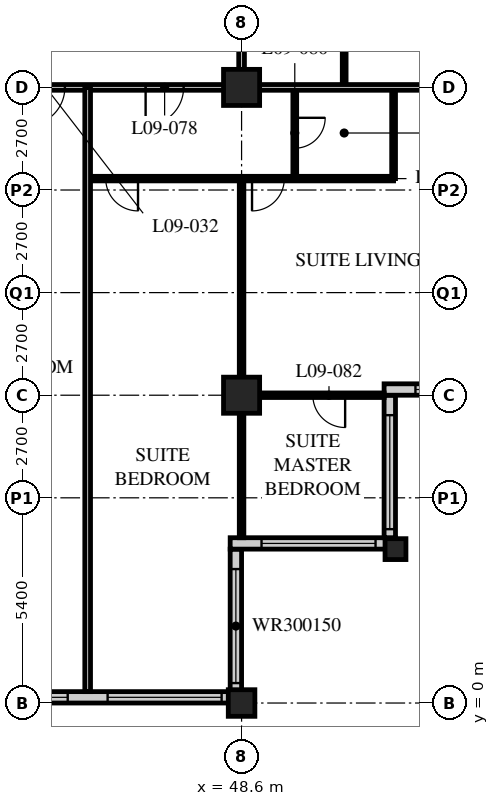
"""IFC4 building model, lengths in metres.
Left out: names, types, materials, properties, quantities, classifications, styles, units other than length and angle.
Written with IfcOpenShell. Run it as: python <this file> out.ifc"""

import sys

from ifc_helpers import new_model, si_unit, direction, frame, frame_2d, origin, origin_2d, place, context, subcontext, project, spatial, rectangle, hollow_rectangle, extrude, element, fill, save


model = new_model("IFC4")
c1 = context("Model", 3, precision=1e-05, world=origin(), true_north=direction((0.0, 1.0)))
c2 = subcontext(c1, "Body", "Model", "MODEL_VIEW")
j1 = project(units=[si_unit("LENGTHUNIT", "METRE"), si_unit("PLANEANGLEUNIT", "RADIAN")], contexts=[c1])
p1 = place(None, origin())
s1 = spatial("IfcSite", under=j1, at=p1, CompositionType="ELEMENT")
p2 = place(p1, origin())
s2 = spatial("IfcBuilding", under=s1, at=p2, CompositionType="ELEMENT")
p3 = place(p2, frame((0.0, 0.0, 43.2)))
s3 = spatial("IfcBuildingStorey", under=s2, at=p3, CompositionType="ELEMENT", Elevation=43.2)
p4 = place(p3, frame((48.6, 0.0, 0.0), z_axis=(0.0, 0.0, 1.0), x_axis=(1.0, 0.0, 0.0)))
e1 = element("IfcColumn", 1, at=p4, inside=s3, PredefinedType="COLUMN", context=c2, shape_type="SweptSolid", body=[
    extrude(hollow_rectangle(XDim=0.7, YDim=0.7, WallThickness=0.06, at=origin_2d()), origin(), (0.0, 0.0, 1.0), 3.4),
])
for number, where, z_axis, x_axis in (
    (2, (48.6, 8.1, 0.0), (0.0, 0.0, 1.0), (1.0, 0.0, 0.0)),
    (3, (48.6, 16.2, 0.0), (0.0, 0.0, 1.0), (1.0, 0.0, 0.0)),
):
    element("IfcColumn", number, at=place(p3, frame(where, z_axis=z_axis, x_axis=x_axis)), inside=s3, PredefinedType="COLUMN", context=c2, shape_type="SweptSolid", body=[
        extrude(hollow_rectangle(XDim=0.95, YDim=0.95, WallThickness=0.095, at=origin_2d()), origin(), (0.0, 0.0, 1.0), 3.4),
    ])
p5 = place(p3, frame((52.65, 4.05, 0.0), z_axis=(0.0, 0.0, 1.0), x_axis=(1.0, 0.0, 0.0)))
e4 = element("IfcColumn", 4, at=p5, inside=s3, PredefinedType="COLUMN", context=c2, shape_type="SweptSolid", body=[
    extrude(hollow_rectangle(XDim=0.55, YDim=0.55, WallThickness=0.05, at=origin_2d()), origin(), (0.0, 0.0, 1.0), 3.4),
])
p6 = place(p3, frame((8.4, 0.15, 0.0), z_axis=(0.0, 0.0, 1.0), x_axis=(1.0, 0.0, 0.0)))
e5 = element("IfcWall", 5, at=p6, inside=s3, PredefinedType="SOLIDWALL", context=c2, shape_type="SweptSolid", body=[
    extrude(rectangle(XDim=40.2, YDim=0.3, at=frame_2d((20.1, 0.0))), origin(), (0.0, 0.0, 1.0), 3.19),
])
p7 = place(p6, frame((0.225, 0.0, 0.9)))
e6 = element("IfcOpeningElement", 6, at=p7, cuts=e5, PredefinedType="OPENING", context=c2, shape_type="SweptSolid", body=[
    extrude(rectangle(XDim=3.0, YDim=2.0, at=frame_2d((1.5, 1.0))), frame((0.0, 0.16, 0.0), z_axis=(0.0, -1.0, 0.0), x_axis=(1.0, 0.0, 0.0)), (0.0, 0.0, 1.0), 0.32),
])
p8 = place(p6, frame((4.275, 0.0, 0.9)))
e7 = element("IfcOpeningElement", 7, at=p8, cuts=e5, PredefinedType="OPENING", context=c2, shape_type="SweptSolid", body=[
    extrude(rectangle(XDim=3.0, YDim=2.0, at=frame_2d((1.5, 1.0))), frame((0.0, 0.16, 0.0), z_axis=(0.0, -1.0, 0.0), x_axis=(1.0, 0.0, 0.0)), (0.0, 0.0, 1.0), 0.32),
])
p9 = place(p6, frame((8.325, 0.0, 0.9)))
e8 = element("IfcOpeningElement", 8, at=p9, cuts=e5, PredefinedType="OPENING", context=c2, shape_type="SweptSolid", body=[
    extrude(rectangle(XDim=3.0, YDim=2.0, at=frame_2d((1.5, 1.0))), frame((0.0, 0.16, 0.0), z_axis=(0.0, -1.0, 0.0), x_axis=(1.0, 0.0, 0.0)), (0.0, 0.0, 1.0), 0.32),
])
p10 = place(p6, frame((12.375, 0.0, 0.9)))
e9 = element("IfcOpeningElement", 9, at=p10, cuts=e5, PredefinedType="OPENING", context=c2, shape_type="SweptSolid", body=[
    extrude(rectangle(XDim=3.0, YDim=2.0, at=frame_2d((1.5, 1.0))), frame((0.0, 0.16, 0.0), z_axis=(0.0, -1.0, 0.0), x_axis=(1.0, 0.0, 0.0)), (0.0, 0.0, 1.0), 0.32),
])
p11 = place(p6, frame((16.425, 0.0, 0.9)))
e10 = element("IfcOpeningElement", 10, at=p11, cuts=e5, PredefinedType="OPENING", context=c2, shape_type="SweptSolid", body=[
    extrude(rectangle(XDim=3.0, YDim=2.0, at=frame_2d((1.5, 1.0))), frame((0.0, 0.16, 0.0), z_axis=(0.0, -1.0, 0.0), x_axis=(1.0, 0.0, 0.0)), (0.0, 0.0, 1.0), 0.32),
])
p12 = place(p6, frame((20.475, 0.0, 0.9)))
e11 = element("IfcOpeningElement", 11, at=p12, cuts=e5, PredefinedType="OPENING", context=c2, shape_type="SweptSolid", body=[
    extrude(rectangle(XDim=3.0, YDim=2.0, at=frame_2d((1.5, 1.0))), frame((0.0, 0.16, 0.0), z_axis=(0.0, -1.0, 0.0), x_axis=(1.0, 0.0, 0.0)), (0.0, 0.0, 1.0), 0.32),
])
p13 = place(p6, frame((24.525, 0.0, 0.9)))
e12 = element("IfcOpeningElement", 12, at=p13, cuts=e5, PredefinedType="OPENING", context=c2, shape_type="SweptSolid", body=[
    extrude(rectangle(XDim=3.0, YDim=2.0, at=frame_2d((1.5, 1.0))), frame((0.0, 0.16, 0.0), z_axis=(0.0, -1.0, 0.0), x_axis=(1.0, 0.0, 0.0)), (0.0, 0.0, 1.0), 0.32),
])
p14 = place(p6, frame((28.575, 0.0, 0.9)))
e13 = element("IfcOpeningElement", 13, at=p14, cuts=e5, PredefinedType="OPENING", context=c2, shape_type="SweptSolid", body=[
    extrude(rectangle(XDim=3.0, YDim=2.0, at=frame_2d((1.5, 1.0))), frame((0.0, 0.16, 0.0), z_axis=(0.0, -1.0, 0.0), x_axis=(1.0, 0.0, 0.0)), (0.0, 0.0, 1.0), 0.32),
])
p15 = place(p6, frame((32.625, 0.0, 0.9)))
e14 = element("IfcOpeningElement", 14, at=p15, cuts=e5, PredefinedType="OPENING", context=c2, shape_type="SweptSolid", body=[
    extrude(rectangle(XDim=3.0, YDim=2.0, at=frame_2d((1.5, 1.0))), frame((0.0, 0.16, 0.0), z_axis=(0.0, -1.0, 0.0), x_axis=(1.0, 0.0, 0.0)), (0.0, 0.0, 1.0), 0.32),
])
p16 = place(p6, frame((36.675, 0.0, 0.9)))
e15 = element("IfcOpeningElement", 15, at=p16, cuts=e5, PredefinedType="OPENING", context=c2, shape_type="SweptSolid", body=[
    extrude(rectangle(XDim=3.0, YDim=2.0, at=frame_2d((1.5, 1.0))), frame((0.0, 0.16, 0.0), z_axis=(0.0, -1.0, 0.0), x_axis=(1.0, 0.0, 0.0)), (0.0, 0.0, 1.0), 0.32),
])
p17 = place(p3, frame((48.45, 0.3, 0.0), z_axis=(0.0, 0.0, 1.0), x_axis=(0.0, 1.0, 0.0)))
e16 = element("IfcWall", 16, at=p17, inside=s3, PredefinedType="SOLIDWALL", context=c2, shape_type="SweptSolid", body=[
    extrude(rectangle(XDim=3.75, YDim=0.3, at=frame_2d((1.875, 0.0))), origin(), (0.0, 0.0, 1.0), 3.19),
])
p18 = place(p17, frame((0.225, 0.0, 0.9)))
e17 = element("IfcOpeningElement", 17, at=p18, cuts=e16, PredefinedType="OPENING", context=c2, shape_type="SweptSolid", body=[
    extrude(rectangle(XDim=3.0, YDim=1.5, at=frame_2d((1.5, 0.75))), frame((0.0, 0.16, 0.0), z_axis=(0.0, -1.0, 0.0), x_axis=(1.0, 0.0, 0.0)), (0.0, 0.0, 1.0), 0.32),
])
p19 = place(p3, frame((48.3, 4.2, 0.0), z_axis=(0.0, 0.0, 1.0), x_axis=(1.0, 0.0, 0.0)))
e18 = element("IfcWall", 18, at=p19, inside=s3, PredefinedType="SOLIDWALL", context=c2, shape_type="SweptSolid", body=[
    extrude(rectangle(XDim=4.35, YDim=0.3, at=frame_2d((2.175, 0.0))), origin(), (0.0, 0.0, 1.0), 3.19),
])
p20 = place(p19, frame((0.825, 0.0, 0.9)))
e19 = element("IfcOpeningElement", 19, at=p20, cuts=e18, PredefinedType="OPENING", context=c2, shape_type="SweptSolid", body=[
    extrude(rectangle(XDim=3.0, YDim=1.5, at=frame_2d((1.5, 0.75))), frame((0.0, 0.16, 0.0), z_axis=(0.0, -1.0, 0.0), x_axis=(1.0, 0.0, 0.0)), (0.0, 0.0, 1.0), 0.32),
])
p21 = place(p3, frame((52.5, 4.35, 0.0), z_axis=(0.0, 0.0, 1.0), x_axis=(0.0, 1.0, 0.0)))
e20 = element("IfcWall", 20, at=p21, inside=s3, PredefinedType="SOLIDWALL", context=c2, shape_type="SweptSolid", body=[
    extrude(rectangle(XDim=3.75, YDim=0.3, at=frame_2d((1.875, 0.0))), origin(), (0.0, 0.0, 1.0), 3.19),
])
p22 = place(p21, frame((0.225, 0.0, 0.9)))
e21 = element("IfcOpeningElement", 21, at=p22, cuts=e20, PredefinedType="OPENING", context=c2, shape_type="SweptSolid", body=[
    extrude(rectangle(XDim=3.0, YDim=1.5, at=frame_2d((1.5, 0.75))), frame((0.0, 0.16, 0.0), z_axis=(0.0, -1.0, 0.0), x_axis=(1.0, 0.0, 0.0)), (0.0, 0.0, 1.0), 0.32),
])
p23 = place(p3, frame((52.35, 8.25, 0.0), z_axis=(0.0, 0.0, 1.0), x_axis=(1.0, 0.0, 0.0)))
e22 = element("IfcWall", 22, at=p23, inside=s3, PredefinedType="SOLIDWALL", context=c2, shape_type="SweptSolid", body=[
    extrude(rectangle(XDim=4.35, YDim=0.3, at=frame_2d((2.175, 0.0))), origin(), (0.0, 0.0, 1.0), 3.19),
])
p24 = place(p23, frame((0.825, 0.0, 0.9)))
e23 = element("IfcOpeningElement", 23, at=p24, cuts=e22, PredefinedType="OPENING", context=c2, shape_type="SweptSolid", body=[
    extrude(rectangle(XDim=3.0, YDim=1.5, at=frame_2d((1.5, 0.75))), frame((0.0, 0.16, 0.0), z_axis=(0.0, -1.0, 0.0), x_axis=(1.0, 0.0, 0.0)), (0.0, 0.0, 1.0), 0.32),
])
p25 = place(p3, frame((8.1, 16.2, 0.0), z_axis=(0.0, 0.0, 1.0), x_axis=(1.0, 0.0, 0.0)))
e24 = element("IfcWall", 24, at=p25, inside=s3, PredefinedType="PARTITIONING", context=c2, shape_type="SweptSolid", body=[
    extrude(rectangle(XDim=40.5, YDim=0.15, at=frame_2d((20.25, 0.0))), origin(), (0.0, 0.0, 1.0), 2.578),
])
p26 = place(p25, frame((4.35, 0.0, 0.0)))
e25 = element("IfcOpeningElement", 25, at=p26, cuts=e24, PredefinedType="OPENING", context=c2, shape_type="SweptSolid", body=[
    extrude(rectangle(XDim=1.0, YDim=2.1, at=frame_2d((0.5, 1.05))), frame((0.0, 0.085, 0.0), z_axis=(0.0, -1.0, 0.0), x_axis=(1.0, 0.0, 0.0)), (0.0, 0.0, 1.0), 0.17),
])
p27 = place(p25, frame((10.85, 0.0, 0.0)))
e26 = element("IfcOpeningElement", 26, at=p27, cuts=e24, PredefinedType="OPENING", context=c2, shape_type="SweptSolid", body=[
    extrude(rectangle(XDim=1.0, YDim=2.1, at=frame_2d((0.5, 1.05))), frame((0.0, 0.085, 0.0), z_axis=(0.0, -1.0, 0.0), x_axis=(1.0, 0.0, 0.0)), (0.0, 0.0, 1.0), 0.17),
])
p28 = place(p25, frame((12.75, 0.0, 0.0)))
e27 = element("IfcOpeningElement", 27, at=p28, cuts=e24, PredefinedType="OPENING", context=c2, shape_type="SweptSolid", body=[
    extrude(rectangle(XDim=1.0, YDim=2.1, at=frame_2d((0.5, 1.05))), frame((0.0, 0.085, 0.0), z_axis=(0.0, -1.0, 0.0), x_axis=(1.0, 0.0, 0.0)), (0.0, 0.0, 1.0), 0.17),
])
p29 = place(p25, frame((18.95, 0.0, 0.0)))
e28 = element("IfcOpeningElement", 28, at=p29, cuts=e24, PredefinedType="OPENING", context=c2, shape_type="SweptSolid", body=[
    extrude(rectangle(XDim=1.0, YDim=2.1, at=frame_2d((0.5, 1.05))), frame((0.0, 0.085, 0.0), z_axis=(0.0, -1.0, 0.0), x_axis=(1.0, 0.0, 0.0)), (0.0, 0.0, 1.0), 0.17),
])
p30 = place(p25, frame((20.55, 0.0, 0.0)))
e29 = element("IfcOpeningElement", 29, at=p30, cuts=e24, PredefinedType="OPENING", context=c2, shape_type="SweptSolid", body=[
    extrude(rectangle(XDim=1.0, YDim=2.1, at=frame_2d((0.5, 1.05))), frame((0.0, 0.085, 0.0), z_axis=(0.0, -1.0, 0.0), x_axis=(1.0, 0.0, 0.0)), (0.0, 0.0, 1.0), 0.17),
])
p31 = place(p25, frame((27.05, 0.0, 0.0)))
e30 = element("IfcOpeningElement", 30, at=p31, cuts=e24, PredefinedType="OPENING", context=c2, shape_type="SweptSolid", body=[
    extrude(rectangle(XDim=1.0, YDim=2.1, at=frame_2d((0.5, 1.05))), frame((0.0, 0.085, 0.0), z_axis=(0.0, -1.0, 0.0), x_axis=(1.0, 0.0, 0.0)), (0.0, 0.0, 1.0), 0.17),
])
p32 = place(p25, frame((28.95, 0.0, 0.0)))
e31 = element("IfcOpeningElement", 31, at=p32, cuts=e24, PredefinedType="OPENING", context=c2, shape_type="SweptSolid", body=[
    extrude(rectangle(XDim=1.0, YDim=2.1, at=frame_2d((0.5, 1.05))), frame((0.0, 0.085, 0.0), z_axis=(0.0, -1.0, 0.0), x_axis=(1.0, 0.0, 0.0)), (0.0, 0.0, 1.0), 0.17),
])
p33 = place(p25, frame((34.85, 0.0, 0.0)))
e32 = element("IfcOpeningElement", 32, at=p33, cuts=e24, PredefinedType="OPENING", context=c2, shape_type="SweptSolid", body=[
    extrude(rectangle(XDim=1.0, YDim=2.1, at=frame_2d((0.5, 1.05))), frame((0.0, 0.085, 0.0), z_axis=(0.0, -1.0, 0.0), x_axis=(1.0, 0.0, 0.0)), (0.0, 0.0, 1.0), 0.17),
])
p34 = place(p25, frame((1.525, 0.0, 0.0)))
e33 = element("IfcOpeningElement", 33, at=p34, cuts=e24, PredefinedType="OPENING", context=c2, shape_type="SweptSolid", body=[
    extrude(rectangle(XDim=1.0, YDim=2.1, at=frame_2d((0.5, 1.05))), frame((0.0, 0.085, 0.0), z_axis=(0.0, -1.0, 0.0), x_axis=(1.0, 0.0, 0.0)), (0.0, 0.0, 1.0), 0.17),
])
p35 = place(p25, frame((37.975, 0.0, 0.0)))
e34 = element("IfcOpeningElement", 34, at=p35, cuts=e24, PredefinedType="OPENING", context=c2, shape_type="SweptSolid", body=[
    extrude(rectangle(XDim=1.0, YDim=2.1, at=frame_2d((0.5, 1.05))), frame((0.0, 0.085, 0.0), z_axis=(0.0, -1.0, 0.0), x_axis=(1.0, 0.0, 0.0)), (0.0, 0.0, 1.0), 0.17),
])
p36 = place(p3, frame((48.6, 16.2, 0.0), z_axis=(0.0, 0.0, 1.0), x_axis=(0.0, 1.0, 0.0)))
e35 = element("IfcWall", 35, at=p36, inside=s3, PredefinedType="PARTITIONING", context=c2, shape_type="SweptSolid", body=[
    extrude(rectangle(XDim=26.1, YDim=0.15, at=frame_2d((13.05, 0.0))), origin(), (0.0, 0.0, 1.0), 2.578),
])
p37 = place(p36, frame((2.75, 0.0, 0.0)))
e36 = element("IfcOpeningElement", 36, at=p37, cuts=e35, PredefinedType="OPENING", context=c2, shape_type="SweptSolid", body=[
    extrude(rectangle(XDim=1.0, YDim=2.1, at=frame_2d((0.5, 1.05))), frame((0.0, 0.085, 0.0), z_axis=(0.0, -1.0, 0.0), x_axis=(1.0, 0.0, 0.0)), (0.0, 0.0, 1.0), 0.17),
])
p38 = place(p36, frame((4.35, 0.0, 0.0)))
e37 = element("IfcOpeningElement", 37, at=p38, cuts=e35, PredefinedType="OPENING", context=c2, shape_type="SweptSolid", body=[
    extrude(rectangle(XDim=1.0, YDim=2.1, at=frame_2d((0.5, 1.05))), frame((0.0, 0.085, 0.0), z_axis=(0.0, -1.0, 0.0), x_axis=(1.0, 0.0, 0.0)), (0.0, 0.0, 1.0), 0.17),
])
p39 = place(p36, frame((10.85, 0.0, 0.0)))
e38 = element("IfcOpeningElement", 38, at=p39, cuts=e35, PredefinedType="OPENING", context=c2, shape_type="SweptSolid", body=[
    extrude(rectangle(XDim=1.0, YDim=2.1, at=frame_2d((0.5, 1.05))), frame((0.0, 0.085, 0.0), z_axis=(0.0, -1.0, 0.0), x_axis=(1.0, 0.0, 0.0)), (0.0, 0.0, 1.0), 0.17),
])
p40 = place(p36, frame((12.45, 0.0, 0.0)))
e39 = element("IfcOpeningElement", 39, at=p40, cuts=e35, PredefinedType="OPENING", context=c2, shape_type="SweptSolid", body=[
    extrude(rectangle(XDim=1.0, YDim=2.1, at=frame_2d((0.5, 1.05))), frame((0.0, 0.085, 0.0), z_axis=(0.0, -1.0, 0.0), x_axis=(1.0, 0.0, 0.0)), (0.0, 0.0, 1.0), 0.17),
])
p41 = place(p36, frame((18.65, 0.0, 0.0)))
e40 = element("IfcOpeningElement", 40, at=p41, cuts=e35, PredefinedType="OPENING", context=c2, shape_type="SweptSolid", body=[
    extrude(rectangle(XDim=1.0, YDim=2.1, at=frame_2d((0.5, 1.05))), frame((0.0, 0.085, 0.0), z_axis=(0.0, -1.0, 0.0), x_axis=(1.0, 0.0, 0.0)), (0.0, 0.0, 1.0), 0.17),
])
p42 = place(p36, frame((22.7, 0.0, 0.0)))
e41 = element("IfcOpeningElement", 41, at=p42, cuts=e35, PredefinedType="OPENING", context=c2, shape_type="SweptSolid", body=[
    extrude(rectangle(XDim=1.0, YDim=2.1, at=frame_2d((0.5, 1.05))), frame((0.0, 0.085, 0.0), z_axis=(0.0, -1.0, 0.0), x_axis=(1.0, 0.0, 0.0)), (0.0, 0.0, 1.0), 0.17),
])
p43 = place(p3, frame((51.3, 16.2, 0.0), z_axis=(0.0, 0.0, 1.0), x_axis=(0.0, 1.0, 0.0)))
e42 = element("IfcWall", 42, at=p43, inside=s3, PredefinedType="PARTITIONING", context=c2, shape_type="SweptSolid", body=[
    extrude(rectangle(XDim=2.6, YDim=0.1, at=frame_2d((1.3, 0.0))), origin(), (0.0, 0.0, 1.0), 3.19),
])
p44 = place(p3, frame((44.55, 13.8, 0.0), z_axis=(0.0, 0.0, 1.0), x_axis=(1.0, 0.0, 0.0)))
e43 = element("IfcWall", 43, at=p44, inside=s3, PredefinedType="PARTITIONING", context=c2, shape_type="SweptSolid", body=[
    extrude(rectangle(XDim=8.05, YDim=0.12, at=frame_2d((4.025, 0.0))), origin(), (0.0, 0.0, 1.0), 3.19),
])
p45 = place(p44, frame((0.475, 0.0, 0.0)))
e44 = element("IfcOpeningElement", 44, at=p45, cuts=e43, PredefinedType="OPENING", context=c2, shape_type="SweptSolid", body=[
    extrude(rectangle(XDim=0.85, YDim=2.1, at=frame_2d((0.425, 1.05))), frame((0.0, 0.07, 0.0), z_axis=(0.0, -1.0, 0.0), x_axis=(1.0, 0.0, 0.0)), (0.0, 0.0, 1.0), 0.14),
])
p46 = place(p44, frame((4.325, 0.0, 0.0)))
e45 = element("IfcOpeningElement", 45, at=p46, cuts=e43, PredefinedType="OPENING", context=c2, shape_type="SweptSolid", body=[
    extrude(rectangle(XDim=0.85, YDim=2.1, at=frame_2d((0.425, 1.05))), frame((0.0, 0.07, 0.0), z_axis=(0.0, -1.0, 0.0), x_axis=(1.0, 0.0, 0.0)), (0.0, 0.0, 1.0), 0.14),
])
p47 = place(p3, frame((50.0, 16.2, 0.0), z_axis=(0.0, 0.0, 1.0), x_axis=(0.0, -1.0, 0.0)))
e46 = element("IfcWall", 46, at=p47, inside=s3, PredefinedType="PARTITIONING", context=c2, shape_type="SweptSolid", body=[
    extrude(rectangle(XDim=2.4, YDim=0.1, at=frame_2d((1.2, 0.0))), origin(), (0.0, 0.0, 1.0), 3.19),
])
p48 = place(p47, frame((0.8, 0.0, 0.0)))
e47 = element("IfcOpeningElement", 47, at=p48, cuts=e46, PredefinedType="OPENING", context=c2, shape_type="SweptSolid", body=[
    extrude(rectangle(XDim=0.8, YDim=2.1, at=frame_2d((0.4, 1.05))), frame((0.0, 0.06, 0.0), z_axis=(0.0, -1.0, 0.0), x_axis=(1.0, 0.0, 0.0)), (0.0, 0.0, 1.0), 0.12),
])
p49 = place(p3, frame((52.6, 16.2, 0.0), z_axis=(0.0, 0.0, 1.0), x_axis=(0.0, -1.0, 0.0)))
e48 = element("IfcWall", 48, at=p49, inside=s3, PredefinedType="PARTITIONING", context=c2, shape_type="SweptSolid", body=[
    extrude(rectangle(XDim=2.4, YDim=0.1, at=frame_2d((1.2, 0.0))), origin(), (0.0, 0.0, 1.0), 3.19),
])
p50 = place(p3, frame((48.6, 13.8, 0.0), z_axis=(0.0, 0.0, 1.0), x_axis=(0.0, -1.0, 0.0)))
e49 = element("IfcWall", 49, at=p50, inside=s3, PredefinedType="PARTITIONING", context=c2, shape_type="SweptSolid", body=[
    extrude(rectangle(XDim=9.45, YDim=0.12, at=frame_2d((4.725, 0.0))), origin(), (0.0, 0.0, 1.0), 2.578),
])
p51 = place(p3, frame((48.6, 8.1, 0.0), z_axis=(0.0, 0.0, 1.0), x_axis=(1.0, 0.0, 0.0)))
e50 = element("IfcWall", 50, at=p51, inside=s3, PredefinedType="PARTITIONING", context=c2, shape_type="SweptSolid", body=[
    extrude(rectangle(XDim=3.75, YDim=0.12, at=frame_2d((1.875, 0.0))), origin(), (0.0, 0.0, 1.0), 2.578),
])
p52 = place(p51, frame((1.875, 0.0, 0.0)))
e51 = element("IfcOpeningElement", 51, at=p52, cuts=e50, PredefinedType="OPENING", context=c2, shape_type="SweptSolid", body=[
    extrude(rectangle(XDim=0.85, YDim=2.1, at=frame_2d((0.425, 1.05))), frame((0.0, 0.07, 0.0), z_axis=(0.0, -1.0, 0.0), x_axis=(1.0, 0.0, 0.0)), (0.0, 0.0, 1.0), 0.14),
])
p53 = place(p3, frame((48.6, 16.2, 0.0), z_axis=(0.0, 0.0, 1.0), x_axis=(1.0, 0.0, 0.0)))
e52 = element("IfcWall", 52, at=p53, inside=s3, PredefinedType="PARTITIONING", context=c2, shape_type="SweptSolid", body=[
    extrude(rectangle(XDim=7.8, YDim=0.15, at=frame_2d((3.9, 0.0))), origin(), (0.0, 0.0, 1.0), 2.578),
])
p54 = place(p3, frame((44.55, 16.2, 0.0), z_axis=(0.0, 0.0, 1.0), x_axis=(0.0, -1.0, 0.0)))
e53 = element("IfcWall", 53, at=p54, inside=s3, PredefinedType="PARTITIONING", context=c2, shape_type="SweptSolid", body=[
    extrude(rectangle(XDim=15.9, YDim=0.15, at=frame_2d((7.95, 0.0))), origin(), (0.0, 0.0, 1.0), 3.19),
])
p55 = place(p15, origin())
e54 = element("IfcWindow", 54, at=p55, inside=s3, PartitioningType="SINGLE_PANEL", PredefinedType="WINDOW", context=c2, shape_type="SweptSolid", body=[
    extrude(rectangle(XDim=3.0, YDim=2.0, at=frame_2d((1.5, 1.0))), frame((0.0, 0.03, 0.0), z_axis=(0.0, -1.0, 0.0), x_axis=(1.0, 0.0, 0.0)), (0.0, 0.0, 1.0), 0.06),
])
fill(e14, e54)
p56 = place(p16, origin())
e55 = element("IfcWindow", 55, at=p56, inside=s3, PartitioningType="SINGLE_PANEL", PredefinedType="WINDOW", context=c2, shape_type="SweptSolid", body=[
    extrude(rectangle(XDim=3.0, YDim=2.0, at=frame_2d((1.5, 1.0))), frame((0.0, 0.03, 0.0), z_axis=(0.0, -1.0, 0.0), x_axis=(1.0, 0.0, 0.0)), (0.0, 0.0, 1.0), 0.06),
])
fill(e15, e55)
p57 = place(p18, origin())
e56 = element("IfcWindow", 56, at=p57, inside=s3, PartitioningType="SINGLE_PANEL", PredefinedType="WINDOW", context=c2, shape_type="SweptSolid", body=[
    extrude(rectangle(XDim=3.0, YDim=1.5, at=frame_2d((1.5, 0.75))), frame((0.0, 0.03, 0.0), z_axis=(0.0, -1.0, 0.0), x_axis=(1.0, 0.0, 0.0)), (0.0, 0.0, 1.0), 0.06),
])
fill(e17, e56)
p58 = place(p20, origin())
e57 = element("IfcWindow", 57, at=p58, inside=s3, PartitioningType="SINGLE_PANEL", PredefinedType="WINDOW", context=c2, shape_type="SweptSolid", body=[
    extrude(rectangle(XDim=3.0, YDim=1.5, at=frame_2d((1.5, 0.75))), frame((0.0, 0.03, 0.0), z_axis=(0.0, -1.0, 0.0), x_axis=(1.0, 0.0, 0.0)), (0.0, 0.0, 1.0), 0.06),
])
fill(e19, e57)
p59 = place(p22, origin())
e58 = element("IfcWindow", 58, at=p59, inside=s3, PartitioningType="SINGLE_PANEL", PredefinedType="WINDOW", context=c2, shape_type="SweptSolid", body=[
    extrude(rectangle(XDim=3.0, YDim=1.5, at=frame_2d((1.5, 0.75))), frame((0.0, 0.03, 0.0), z_axis=(0.0, -1.0, 0.0), x_axis=(1.0, 0.0, 0.0)), (0.0, 0.0, 1.0), 0.06),
])
fill(e21, e58)
p60 = place(p24, origin())
e59 = element("IfcWindow", 59, at=p60, inside=s3, PartitioningType="SINGLE_PANEL", PredefinedType="WINDOW", context=c2, shape_type="SweptSolid", body=[
    extrude(rectangle(XDim=3.0, YDim=1.5, at=frame_2d((1.5, 0.75))), frame((0.0, 0.03, 0.0), z_axis=(0.0, -1.0, 0.0), x_axis=(1.0, 0.0, 0.0)), (0.0, 0.0, 1.0), 0.06),
])
fill(e23, e59)
p61 = place(p33, origin())
e60 = element("IfcDoor", 60, at=p61, inside=s3, OperationType="SINGLE_SWING_RIGHT", PredefinedType="DOOR", context=c2, shape_type="SweptSolid", body=[
    extrude(rectangle(XDim=1.0, YDim=2.1, at=frame_2d((0.5, 1.05))), frame((0.0, 0.025, 0.0), z_axis=(0.0, -1.0, 0.0), x_axis=(1.0, 0.0, 0.0)), (0.0, 0.0, 1.0), 0.05),
])
fill(e32, e60)
p62 = place(p35, origin())
e61 = element("IfcDoor", 61, at=p62, inside=s3, OperationType="SINGLE_SWING_RIGHT", PredefinedType="DOOR", context=c2, shape_type="SweptSolid", body=[
    extrude(rectangle(XDim=1.0, YDim=2.1, at=frame_2d((0.5, 1.05))), frame((0.0, 0.025, 0.0), z_axis=(0.0, -1.0, 0.0), x_axis=(1.0, 0.0, 0.0)), (0.0, 0.0, 1.0), 0.05),
])
fill(e34, e61)
p63 = place(p45, origin())
e62 = element("IfcDoor", 62, at=p63, inside=s3, OperationType="SINGLE_SWING_LEFT", PredefinedType="DOOR", context=c2, shape_type="SweptSolid", body=[
    extrude(rectangle(XDim=0.85, YDim=2.1, at=frame_2d((0.425, 1.05))), frame((0.0, 0.025, 0.0), z_axis=(0.0, -1.0, 0.0), x_axis=(1.0, 0.0, 0.0)), (0.0, 0.0, 1.0), 0.05),
])
fill(e44, e62)
p64 = place(p48, origin())
e63 = element("IfcDoor", 63, at=p64, inside=s3, OperationType="SINGLE_SWING_LEFT", PredefinedType="DOOR", context=c2, shape_type="SweptSolid", body=[
    extrude(rectangle(XDim=0.8, YDim=2.1, at=frame_2d((0.4, 1.05))), frame((0.0, 0.025, 0.0), z_axis=(0.0, -1.0, 0.0), x_axis=(1.0, 0.0, 0.0)), (0.0, 0.0, 1.0), 0.05),
])
fill(e47, e63)
p65 = place(p46, origin())
e64 = element("IfcDoor", 64, at=p65, inside=s3, OperationType="SINGLE_SWING_RIGHT", PredefinedType="DOOR", context=c2, shape_type="SweptSolid", body=[
    extrude(rectangle(XDim=0.85, YDim=2.1, at=frame_2d((0.425, 1.05))), frame((0.0, 0.025, 0.0), z_axis=(0.0, -1.0, 0.0), x_axis=(1.0, 0.0, 0.0)), (0.0, 0.0, 1.0), 0.05),
])
fill(e45, e64)
p66 = place(p52, origin())
e65 = element("IfcDoor", 65, at=p66, inside=s3, OperationType="SINGLE_SWING_LEFT", PredefinedType="DOOR", context=c2, shape_type="SweptSolid", body=[
    extrude(rectangle(XDim=0.85, YDim=2.1, at=frame_2d((0.425, 1.05))), frame((0.0, 0.025, 0.0), z_axis=(0.0, -1.0, 0.0), x_axis=(1.0, 0.0, 0.0)), (0.0, 0.0, 1.0), 0.05),
])
fill(e51, e65)
save(model, sys.argv[1])
